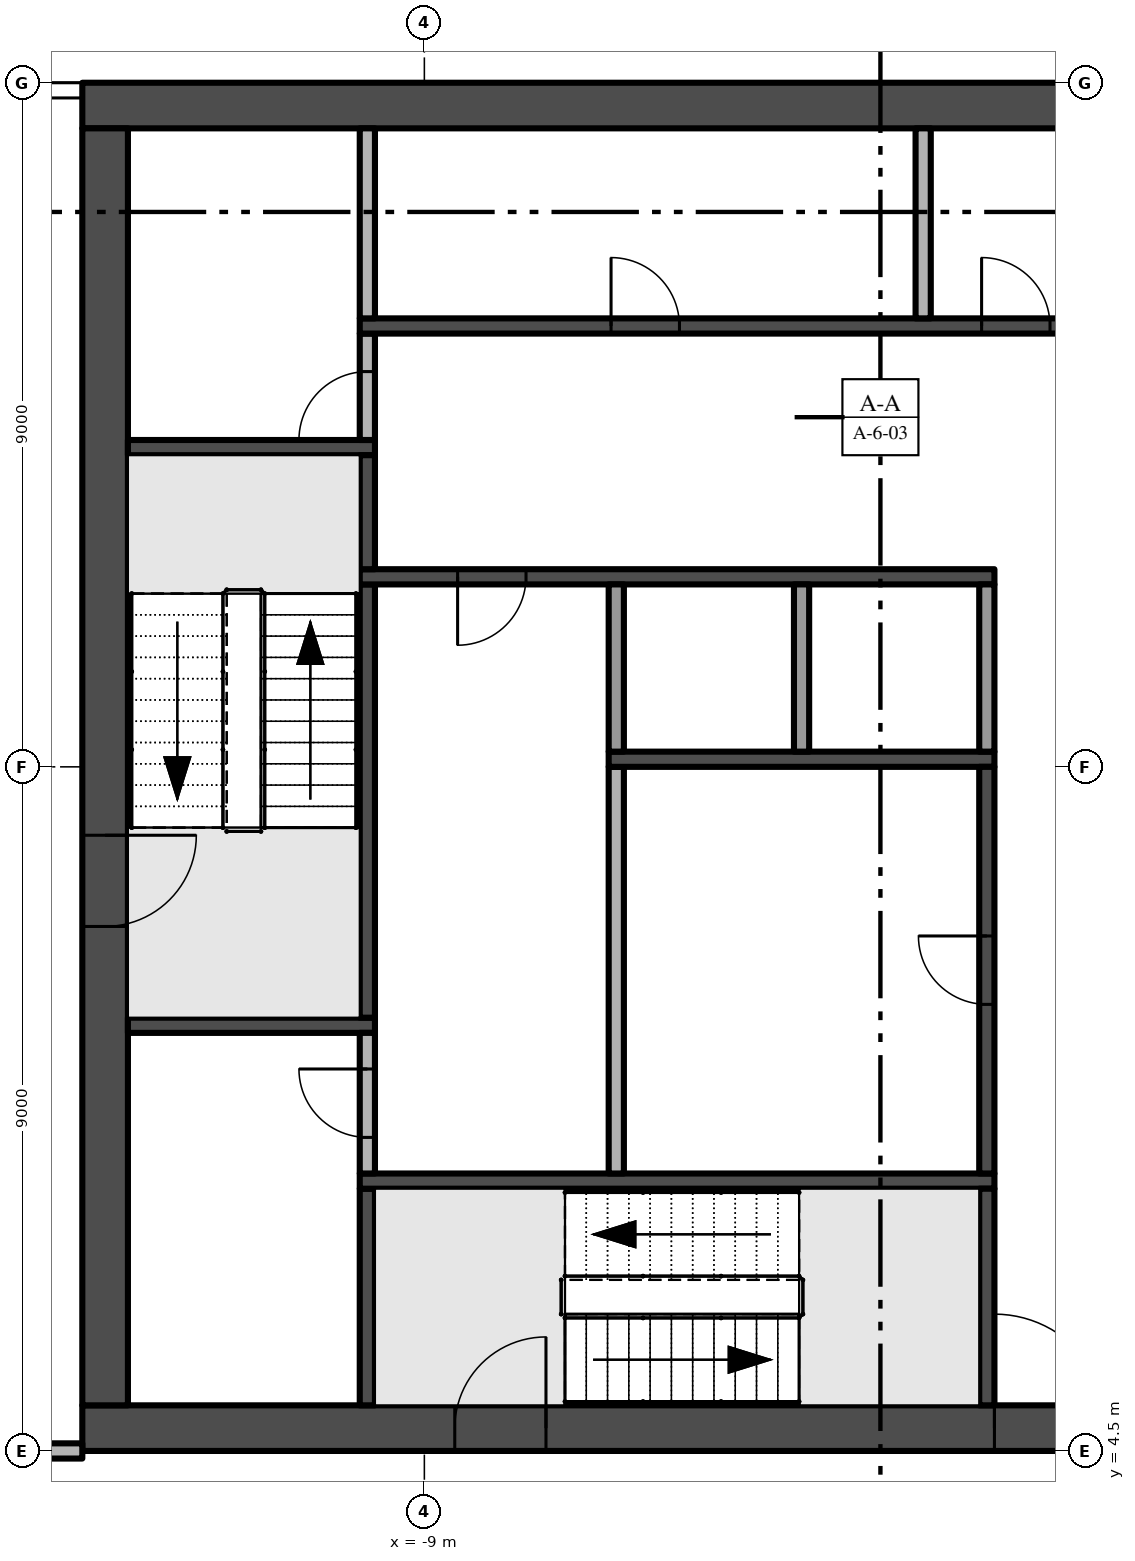
"""IFC4 building model, lengths in metres.
Left out: names, types, materials, properties, quantities, classifications, styles, units other than length and angle.
Written with IfcOpenShell. Run it as: python <this file> out.ifc"""

import sys

from ifc_helpers import new_model, si_unit, direction, frame, frame_2d, origin, place, context, subcontext, project, spatial, rectangle, extrude, element, fill, save


model = new_model("IFC4")
c1 = context("Model", 3, precision=1e-05, world=origin(), true_north=direction((0.0, 1.0)))
c2 = subcontext(c1, "Body", "Model", "MODEL_VIEW")
j1 = project(units=[si_unit("LENGTHUNIT", "METRE"), si_unit("PLANEANGLEUNIT", "RADIAN")], contexts=[c1])
p1 = place(None, origin())
s1 = spatial("IfcSite", under=j1, at=p1, CompositionType="ELEMENT")
p2 = place(p1, origin())
s2 = spatial("IfcBuilding", under=s1, at=p2, CompositionType="ELEMENT")
p3 = place(p2, frame((0.0, 0.0, 289.4)))
s3 = spatial("IfcBuildingStorey", under=s2, at=p3, CompositionType="ELEMENT", Elevation=289.4)
p4 = place(p3, frame((-13.5, 4.8, -0.3), z_axis=(0.0, 0.0, 1.0), x_axis=(1.0, 0.0, 0.0)))
e1 = element("IfcWall", 1, at=p4, inside=s3, PredefinedType="SHEAR", context=c2, shape_type="SweptSolid", body=[
    extrude(rectangle(XDim=27.0, YDim=0.6, at=frame_2d((13.5, 0.0))), origin(), (0.0, 0.0, 1.0), 8.0),
])
p5 = place(p4, frame((12.0, 0.0, 0.3)))
e2 = element("IfcOpeningElement", 2, at=p5, cuts=e1, PredefinedType="OPENING", context=c2, shape_type="SweptSolid", body=[
    extrude(rectangle(XDim=3.0, YDim=2.4, at=frame_2d((1.5, 1.2))), frame((0.0, 0.31, 0.0), z_axis=(0.0, -1.0, 0.0), x_axis=(1.0, 0.0, 0.0)), (0.0, 0.0, 1.0), 0.62),
])
p6 = place(p4, frame((4.9, 0.0, 0.3)))
e3 = element("IfcOpeningElement", 3, at=p6, cuts=e1, PredefinedType="OPENING", context=c2, shape_type="SweptSolid", body=[
    extrude(rectangle(XDim=1.2, YDim=2.2, at=frame_2d((0.6, 1.1))), frame((0.0, 0.31, 0.0), z_axis=(0.0, -1.0, 0.0), x_axis=(1.0, 0.0, 0.0)), (0.0, 0.0, 1.0), 0.62),
])
p7 = place(p4, frame((20.75, 0.0, 0.3)))
e4 = element("IfcOpeningElement", 4, at=p7, cuts=e1, PredefinedType="OPENING", context=c2, shape_type="SweptSolid", body=[
    extrude(rectangle(XDim=1.5, YDim=2.2, at=frame_2d((0.75, 1.1))), frame((0.0, 0.31, 0.0), z_axis=(0.0, -1.0, 0.0), x_axis=(1.0, 0.0, 0.0)), (0.0, 0.0, 1.0), 0.62),
])
p8 = place(p4, frame((17.4, 0.0, 0.3)))
e5 = element("IfcOpeningElement", 5, at=p8, cuts=e1, PredefinedType="OPENING", context=c2, shape_type="SweptSolid", body=[
    extrude(rectangle(XDim=1.2, YDim=2.2, at=frame_2d((0.6, 1.1))), frame((0.0, 0.31, 0.0), z_axis=(0.0, -1.0, 0.0), x_axis=(1.0, 0.0, 0.0)), (0.0, 0.0, 1.0), 0.62),
])
p9 = place(p3, frame((13.5, 22.2, -0.3), z_axis=(0.0, 0.0, 1.0), x_axis=(-1.0, 0.0, 0.0)))
e6 = element("IfcWall", 6, at=p9, inside=s3, PredefinedType="SHEAR", context=c2, shape_type="SweptSolid", body=[
    extrude(rectangle(XDim=27.0, YDim=0.6, at=frame_2d((13.5, 0.0))), origin(), (0.0, 0.0, 1.0), 8.0),
])
p10 = place(p3, frame((-13.2, 21.9, -0.3), z_axis=(0.0, 0.0, 1.0), x_axis=(0.0, -1.0, 0.0)))
e7 = element("IfcWall", 7, at=p10, inside=s3, PredefinedType="SHEAR", context=c2, shape_type="SweptSolid", body=[
    extrude(rectangle(XDim=16.8, YDim=0.6, at=frame_2d((8.4, 0.0))), origin(), (0.0, 0.0, 1.0), 8.0),
])
p11 = place(p10, frame((9.3, 0.0, 0.3)))
e8 = element("IfcOpeningElement", 8, at=p11, cuts=e7, PredefinedType="OPENING", context=c2, shape_type="SweptSolid", body=[
    extrude(rectangle(XDim=1.2, YDim=2.2, at=frame_2d((0.6, 1.1))), frame((0.0, 0.31, 0.0), z_axis=(0.0, -1.0, 0.0), x_axis=(1.0, 0.0, 0.0)), (0.0, 0.0, 1.0), 0.62),
])
for number, where, z_axis, x_axis in (
    (9, (-12.9, 10.1, 0.0), (0.0, 0.0, 1.0), (1.0, 0.0, 0.0)),
    (10, (-12.9, 17.7, 0.0), (0.0, 0.0, 1.0), (1.0, 0.0, 0.0)),
):
    element("IfcWall", number, at=place(p3, frame(where, z_axis=z_axis, x_axis=x_axis)), inside=s3, PredefinedType="SHEAR", context=c2, shape_type="SweptSolid", body=[
        extrude(rectangle(XDim=3.25, YDim=0.2, at=frame_2d((1.625, 0.0))), origin(), (0.0, 0.0, 1.0), 7.7),
    ])
p12 = place(p3, frame((-9.75, 5.1, 0.0), z_axis=(0.0, 0.0, 1.0), x_axis=(0.0, 1.0, 0.0)))
e11 = element("IfcWall", 11, at=p12, inside=s3, PredefinedType="SHEAR", context=c2, shape_type="SweptSolid", body=[
    extrude(rectangle(XDim=2.85, YDim=0.2, at=frame_2d((1.425, 0.0))), origin(), (0.0, 0.0, 1.0), 7.7),
])
p13 = place(p3, frame((-9.85, 8.05, 0.0), z_axis=(0.0, 0.0, 1.0), x_axis=(1.0, 0.0, 0.0)))
e12 = element("IfcWall", 12, at=p13, inside=s3, PredefinedType="SHEAR", context=c2, shape_type="SweptSolid", body=[
    extrude(rectangle(XDim=8.35, YDim=0.2, at=frame_2d((4.175, 0.0))), origin(), (0.0, 0.0, 1.0), 7.7),
])
p14 = place(p3, frame((-9.75, 8.15, 0.0), z_axis=(0.0, 0.0, 1.0), x_axis=(0.0, 1.0, 0.0)))
e13 = element("IfcWall", 13, at=p14, inside=s3, PredefinedType="PARTITIONING", context=c2, shape_type="SweptSolid", body=[
    extrude(rectangle(XDim=1.85, YDim=0.2, at=frame_2d((0.925, 0.0))), origin(), (0.0, 0.0, 1.0), 7.7),
])
p15 = place(p14, frame((0.475, 0.0, 0.0)))
e14 = element("IfcOpeningElement", 14, at=p15, cuts=e13, PredefinedType="OPENING", context=c2, shape_type="SweptSolid", body=[
    extrude(rectangle(XDim=0.9, YDim=2.1, at=frame_2d((0.45, 1.05))), frame((0.0, 0.11, 0.0), z_axis=(0.0, -1.0, 0.0), x_axis=(1.0, 0.0, 0.0)), (0.0, 0.0, 1.0), 0.22),
])
p16 = place(p3, frame((-9.75, 10.2, 0.0), z_axis=(0.0, 0.0, 1.0), x_axis=(0.0, 1.0, 0.0)))
e15 = element("IfcWall", 15, at=p16, inside=s3, PredefinedType="SHEAR", context=c2, shape_type="SweptSolid", body=[
    extrude(rectangle(XDim=5.7, YDim=0.2, at=frame_2d((2.85, 0.0))), origin(), (0.0, 0.0, 1.0), 7.7),
])
p17 = place(p3, frame((-1.5, 16.0, 0.0), z_axis=(0.0, 0.0, 1.0), x_axis=(-1.0, 0.0, 0.0)))
e16 = element("IfcWall", 16, at=p17, inside=s3, PredefinedType="SHEAR", context=c2, shape_type="SweptSolid", body=[
    extrude(rectangle(XDim=8.35, YDim=0.2, at=frame_2d((4.175, 0.0))), origin(), (0.0, 0.0, 1.0), 7.7),
])
p18 = place(p17, frame((6.162, 0.0, 0.0)))
e17 = element("IfcOpeningElement", 17, at=p18, cuts=e16, PredefinedType="OPENING", context=c2, shape_type="SweptSolid", body=[
    extrude(rectangle(XDim=0.9, YDim=2.1, at=frame_2d((0.45, 1.05))), frame((0.0, 0.11, 0.0), z_axis=(0.0, -1.0, 0.0), x_axis=(1.0, 0.0, 0.0)), (0.0, 0.0, 1.0), 0.22),
])
p19 = place(p3, frame((-9.75, 16.1, 0.0), z_axis=(0.0, 0.0, 1.0), x_axis=(0.0, 1.0, 0.0)))
e18 = element("IfcWall", 18, at=p19, inside=s3, PredefinedType="SHEAR", context=c2, shape_type="SweptSolid", body=[
    extrude(rectangle(XDim=1.5, YDim=0.2, at=frame_2d((0.75, 0.0))), origin(), (0.0, 0.0, 1.0), 7.7),
])
p20 = place(p3, frame((-9.75, 17.8, 0.0), z_axis=(0.0, 0.0, 1.0), x_axis=(0.0, 1.0, 0.0)))
e19 = element("IfcWall", 19, at=p20, inside=s3, PredefinedType="PARTITIONING", context=c2, shape_type="SweptSolid", body=[
    extrude(rectangle(XDim=1.4, YDim=0.2, at=frame_2d((0.7, 0.0))), origin(), (0.0, 0.0, 1.0), 7.7),
])
p21 = place(p20, origin())
e20 = element("IfcOpeningElement", 20, at=p21, cuts=e19, PredefinedType="OPENING", context=c2, shape_type="SweptSolid", body=[
    extrude(rectangle(XDim=0.9, YDim=2.1, at=frame_2d((0.45, 1.05))), frame((0.0, 0.11, 0.0), z_axis=(0.0, -1.0, 0.0), x_axis=(1.0, 0.0, 0.0)), (0.0, 0.0, 1.0), 0.22),
])
p22 = place(p3, frame((-9.85, 19.3, 0.0), z_axis=(0.0, 0.0, 1.0), x_axis=(1.0, 0.0, 0.0)))
e21 = element("IfcWall", 21, at=p22, inside=s3, PredefinedType="SHEAR", context=c2, shape_type="SweptSolid", body=[
    extrude(rectangle(XDim=19.7, YDim=0.2, at=frame_2d((9.85, 0.0))), origin(), (0.0, 0.0, 1.0), 7.7),
])
p23 = place(p22, frame((3.306, 0.0, 0.0)))
e22 = element("IfcOpeningElement", 22, at=p23, cuts=e21, PredefinedType="OPENING", context=c2, shape_type="SweptSolid", body=[
    extrude(rectangle(XDim=0.9, YDim=2.1, at=frame_2d((0.45, 1.05))), frame((0.0, 0.11, 0.0), z_axis=(0.0, -1.0, 0.0), x_axis=(1.0, 0.0, 0.0)), (0.0, 0.0, 1.0), 0.22),
])
p24 = place(p22, frame((8.181, 0.0, 0.0)))
e23 = element("IfcOpeningElement", 23, at=p24, cuts=e21, PredefinedType="OPENING", context=c2, shape_type="SweptSolid", body=[
    extrude(rectangle(XDim=0.9, YDim=2.1, at=frame_2d((0.45, 1.05))), frame((0.0, 0.11, 0.0), z_axis=(0.0, -1.0, 0.0), x_axis=(1.0, 0.0, 0.0)), (0.0, 0.0, 1.0), 0.22),
])
p25 = place(p3, frame((-9.75, 19.4, 0.0), z_axis=(0.0, 0.0, 1.0), x_axis=(0.0, 1.0, 0.0)))
e24 = element("IfcWall", 24, at=p25, inside=s3, PredefinedType="PARTITIONING", context=c2, shape_type="SweptSolid", body=[
    extrude(rectangle(XDim=2.5, YDim=0.2, at=frame_2d((1.25, 0.0))), origin(), (0.0, 0.0, 1.0), 7.7),
])
p26 = place(p3, frame((-6.475, 8.15, 0.0), z_axis=(0.0, 0.0, 1.0), x_axis=(0.0, 1.0, 0.0)))
e25 = element("IfcWall", 25, at=p26, inside=s3, PredefinedType="PARTITIONING", context=c2, shape_type="SweptSolid", body=[
    extrude(rectangle(XDim=5.35, YDim=0.2, at=frame_2d((2.675, 0.0))), origin(), (0.0, 0.0, 1.0), 7.7),
])
p27 = place(p3, frame((-6.575, 13.6, 0.0), z_axis=(0.0, 0.0, 1.0), x_axis=(1.0, 0.0, 0.0)))
e26 = element("IfcWall", 26, at=p27, inside=s3, PredefinedType="SHEAR", context=c2, shape_type="SweptSolid", body=[
    extrude(rectangle(XDim=5.075, YDim=0.2, at=frame_2d((2.538, 0.0))), origin(), (0.0, 0.0, 1.0), 7.7),
])
for number, where, z_axis, x_axis in (
    (27, (-6.475, 13.7, 0.0), (0.0, 0.0, 1.0), (0.0, 1.0, 0.0)),
    (28, (-4.037, 13.7, 0.0), (0.0, 0.0, 1.0), (0.0, 1.0, 0.0)),
):
    element("IfcWall", number, at=place(p3, frame(where, z_axis=z_axis, x_axis=x_axis)), inside=s3, PredefinedType="PARTITIONING", context=c2, shape_type="SweptSolid", body=[
        extrude(rectangle(XDim=2.2, YDim=0.2, at=frame_2d((1.1, 0.0))), origin(), (0.0, 0.0, 1.0), 7.7),
    ])
p28 = place(p3, frame((-2.438, 19.4, 0.0), z_axis=(0.0, 0.0, 1.0), x_axis=(0.0, 1.0, 0.0)))
e29 = element("IfcWall", 29, at=p28, inside=s3, PredefinedType="PARTITIONING", context=c2, shape_type="SweptSolid", body=[
    extrude(rectangle(XDim=2.5, YDim=0.2, at=frame_2d((1.25, 0.0))), origin(), (0.0, 0.0, 1.0), 7.7),
])
p29 = place(p3, frame((-1.6, 5.1, 0.0), z_axis=(0.0, 0.0, 1.0), x_axis=(0.0, 1.0, 0.0)))
e30 = element("IfcWall", 30, at=p29, inside=s3, PredefinedType="SHEAR", context=c2, shape_type="SweptSolid", body=[
    extrude(rectangle(XDim=2.85, YDim=0.2, at=frame_2d((1.425, 0.0))), origin(), (0.0, 0.0, 1.0), 7.7),
])
p30 = place(p3, frame((-1.6, 8.15, 0.0), z_axis=(0.0, 0.0, 1.0), x_axis=(0.0, 1.0, 0.0)))
e31 = element("IfcWall", 31, at=p30, inside=s3, PredefinedType="SHEAR", context=c2, shape_type="SweptSolid", body=[
    extrude(rectangle(XDim=5.35, YDim=0.2, at=frame_2d((2.675, 0.0))), origin(), (0.0, 0.0, 1.0), 7.7),
])
p31 = place(p30, frame((2.225, 0.0, 0.0)))
e32 = element("IfcOpeningElement", 32, at=p31, cuts=e31, PredefinedType="OPENING", context=c2, shape_type="SweptSolid", body=[
    extrude(rectangle(XDim=0.9, YDim=2.1, at=frame_2d((0.45, 1.05))), frame((0.0, 0.11, 0.0), z_axis=(0.0, -1.0, 0.0), x_axis=(1.0, 0.0, 0.0)), (0.0, 0.0, 1.0), 0.22),
])
p32 = place(p3, frame((-1.6, 13.7, 0.0), z_axis=(0.0, 0.0, 1.0), x_axis=(0.0, 1.0, 0.0)))
e33 = element("IfcWall", 33, at=p32, inside=s3, PredefinedType="PARTITIONING", context=c2, shape_type="SweptSolid", body=[
    extrude(rectangle(XDim=2.2, YDim=0.2, at=frame_2d((1.1, 0.0))), origin(), (0.0, 0.0, 1.0), 7.7),
])
p33 = place(p3, frame((-17.55, 4.5, 0.0), z_axis=(0.0, 0.0, 1.0), x_axis=(1.0, 0.0, 0.0)))
e34 = element("IfcWall", 34, at=p33, inside=s3, PredefinedType="PARTITIONING", context=c2, shape_type="SweptSolid", body=[
    extrude(rectangle(XDim=4.05, YDim=0.2, at=frame_2d((2.025, 0.0))), origin(), (0.0, 0.0, 1.0), 7.7),
])
p34 = place(p5, frame((3.0, 0.0, 0.0), z_axis=(0.0, 0.0, 1.0), x_axis=(-1.0, 0.0, 0.0)))
e35 = element("IfcDoor", 35, at=p34, inside=s3, OperationType="DOUBLE_DOOR_SINGLE_SWING", PredefinedType="DOOR", context=c2, shape_type="SweptSolid", body=[
    extrude(rectangle(XDim=3.0, YDim=2.4, at=frame_2d((1.5, 1.2))), frame((0.0, 0.025, 0.0), z_axis=(0.0, -1.0, 0.0), x_axis=(1.0, 0.0, 0.0)), (0.0, 0.0, 1.0), 0.05),
])
fill(e2, e35)
p35 = place(p11, frame((1.2, 0.0, 0.0), z_axis=(0.0, 0.0, 1.0), x_axis=(-1.0, 0.0, 0.0)))
e36 = element("IfcDoor", 36, at=p35, inside=s3, OperationType="SINGLE_SWING_RIGHT", PredefinedType="DOOR", context=c2, shape_type="SweptSolid", body=[
    extrude(rectangle(XDim=1.2, YDim=2.2, at=frame_2d((0.6, 1.1))), frame((0.0, 0.025, 0.0), z_axis=(0.0, -1.0, 0.0), x_axis=(1.0, 0.0, 0.0)), (0.0, 0.0, 1.0), 0.05),
])
fill(e8, e36)
p36 = place(p6, frame((1.2, 0.0, 0.0), z_axis=(0.0, 0.0, 1.0), x_axis=(-1.0, 0.0, 0.0)))
e37 = element("IfcDoor", 37, at=p36, inside=s3, OperationType="SINGLE_SWING_LEFT", PredefinedType="DOOR", context=c2, shape_type="SweptSolid", body=[
    extrude(rectangle(XDim=1.2, YDim=2.2, at=frame_2d((0.6, 1.1))), frame((0.0, 0.025, 0.0), z_axis=(0.0, -1.0, 0.0), x_axis=(1.0, 0.0, 0.0)), (0.0, 0.0, 1.0), 0.05),
])
fill(e3, e37)
p37 = place(p18, origin())
e38 = element("IfcDoor", 38, at=p37, inside=s3, OperationType="SINGLE_SWING_RIGHT", PredefinedType="DOOR", context=c2, shape_type="SweptSolid", body=[
    extrude(rectangle(XDim=0.9, YDim=2.1, at=frame_2d((0.45, 1.05))), frame((0.0, 0.025, 0.0), z_axis=(0.0, -1.0, 0.0), x_axis=(1.0, 0.0, 0.0)), (0.0, 0.0, 1.0), 0.05),
])
fill(e17, e38)
p38 = place(p31, origin())
e39 = element("IfcDoor", 39, at=p38, inside=s3, OperationType="SINGLE_SWING_RIGHT", PredefinedType="DOOR", context=c2, shape_type="SweptSolid", body=[
    extrude(rectangle(XDim=0.9, YDim=2.1, at=frame_2d((0.45, 1.05))), frame((0.0, 0.025, 0.0), z_axis=(0.0, -1.0, 0.0), x_axis=(1.0, 0.0, 0.0)), (0.0, 0.0, 1.0), 0.05),
])
fill(e32, e39)
p39 = place(p21, origin())
e40 = element("IfcDoor", 40, at=p39, inside=s3, OperationType="SINGLE_SWING_LEFT", PredefinedType="DOOR", context=c2, shape_type="SweptSolid", body=[
    extrude(rectangle(XDim=0.9, YDim=2.1, at=frame_2d((0.45, 1.05))), frame((0.0, 0.025, 0.0), z_axis=(0.0, -1.0, 0.0), x_axis=(1.0, 0.0, 0.0)), (0.0, 0.0, 1.0), 0.05),
])
fill(e20, e40)
p40 = place(p23, origin())
e41 = element("IfcDoor", 41, at=p40, inside=s3, OperationType="SINGLE_SWING_LEFT", PredefinedType="DOOR", context=c2, shape_type="SweptSolid", body=[
    extrude(rectangle(XDim=0.9, YDim=2.1, at=frame_2d((0.45, 1.05))), frame((0.0, 0.025, 0.0), z_axis=(0.0, -1.0, 0.0), x_axis=(1.0, 0.0, 0.0)), (0.0, 0.0, 1.0), 0.05),
])
fill(e22, e41)
p41 = place(p24, origin())
e42 = element("IfcDoor", 42, at=p41, inside=s3, OperationType="SINGLE_SWING_LEFT", PredefinedType="DOOR", context=c2, shape_type="SweptSolid", body=[
    extrude(rectangle(XDim=0.9, YDim=2.1, at=frame_2d((0.45, 1.05))), frame((0.0, 0.025, 0.0), z_axis=(0.0, -1.0, 0.0), x_axis=(1.0, 0.0, 0.0)), (0.0, 0.0, 1.0), 0.05),
])
fill(e23, e42)
p42 = place(p15, origin())
e43 = element("IfcDoor", 43, at=p42, inside=s3, OperationType="SINGLE_SWING_RIGHT", PredefinedType="DOOR", context=c2, shape_type="SweptSolid", body=[
    extrude(rectangle(XDim=0.9, YDim=2.1, at=frame_2d((0.45, 1.05))), frame((0.0, 0.025, 0.0), z_axis=(0.0, -1.0, 0.0), x_axis=(1.0, 0.0, 0.0)), (0.0, 0.0, 1.0), 0.05),
])
fill(e14, e43)
save(model, sys.argv[1])
